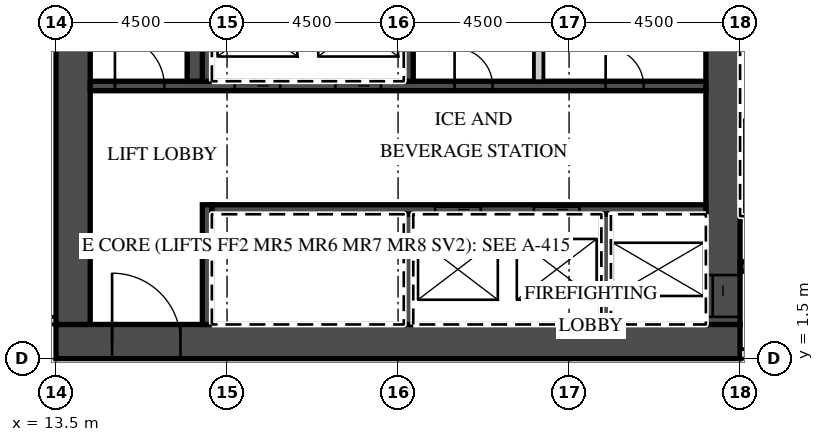
"""IFC4 building model, lengths in metres.
Left out: names, types, materials, properties, quantities, classifications, styles, units other than length and angle.
Written with IfcOpenShell. Run it as: python <this file> out.ifc"""

import sys

from ifc_helpers import new_model, si_unit, direction, frame, frame_2d, origin, place, context, subcontext, project, spatial, rectangle, extrude, element, fill, save


model = new_model("IFC4")
c1 = context("Model", 3, precision=1e-05, world=origin(), true_north=direction((0.0, 1.0)))
c2 = subcontext(c1, "Body", "Model", "MODEL_VIEW")
j1 = project(units=[si_unit("LENGTHUNIT", "METRE"), si_unit("PLANEANGLEUNIT", "RADIAN")], contexts=[c1])
p1 = place(None, origin())
s1 = spatial("IfcSite", under=j1, at=p1, CompositionType="ELEMENT")
p2 = place(p1, origin())
s2 = spatial("IfcBuilding", under=s1, at=p2, CompositionType="ELEMENT")
p3 = place(p2, frame((0.0, 0.0, 170.2)))
s3 = spatial("IfcBuildingStorey", under=s2, at=p3, CompositionType="ELEMENT", Elevation=170.2)
p4 = place(p3, frame((-13.5, 2.5, 0.0), z_axis=(0.0, 0.0, 1.0), x_axis=(1.0, 0.0, 0.0)))
e1 = element("IfcWall", 1, at=p4, inside=s3, PredefinedType="PARTITIONING", context=c2, shape_type="SweptSolid", body=[
    extrude(rectangle(XDim=27.0, YDim=0.2, at=frame_2d((13.5, 0.0))), origin(), (0.0, 0.0, 1.0), 3.02),
])
p5 = place(p4, frame((0.575, 0.0, 0.0)))
e2 = element("IfcOpeningElement", 2, at=p5, cuts=e1, PredefinedType="OPENING", context=c2, shape_type="SweptSolid", body=[
    extrude(rectangle(XDim=1.0, YDim=2.1, at=frame_2d((0.5, 1.05))), frame((0.0, 0.11, 0.0), z_axis=(0.0, -1.0, 0.0), x_axis=(1.0, 0.0, 0.0)), (0.0, 0.0, 1.0), 0.22),
])
p6 = place(p4, frame((7.45, 0.0, 0.0)))
e3 = element("IfcOpeningElement", 3, at=p6, cuts=e1, PredefinedType="OPENING", context=c2, shape_type="SweptSolid", body=[
    extrude(rectangle(XDim=1.0, YDim=2.1, at=frame_2d((0.5, 1.05))), frame((0.0, 0.11, 0.0), z_axis=(0.0, -1.0, 0.0), x_axis=(1.0, 0.0, 0.0)), (0.0, 0.0, 1.0), 0.22),
])
p7 = place(p4, frame((11.925, 0.0, 0.0)))
e4 = element("IfcOpeningElement", 4, at=p7, cuts=e1, PredefinedType="OPENING", context=c2, shape_type="SweptSolid", body=[
    extrude(rectangle(XDim=1.0, YDim=2.1, at=frame_2d((0.5, 1.05))), frame((0.0, 0.11, 0.0), z_axis=(0.0, -1.0, 0.0), x_axis=(1.0, 0.0, 0.0)), (0.0, 0.0, 1.0), 0.22),
])
p8 = place(p4, frame((15.938, 0.0, 0.0)))
e5 = element("IfcOpeningElement", 5, at=p8, cuts=e1, PredefinedType="OPENING", context=c2, shape_type="SweptSolid", body=[
    extrude(rectangle(XDim=1.2, YDim=2.1, at=frame_2d((0.6, 1.05))), frame((0.0, 0.11, 0.0), z_axis=(0.0, -1.0, 0.0), x_axis=(1.0, 0.0, 0.0)), (0.0, 0.0, 1.0), 0.22),
])
p9 = place(p4, frame((25.425, 0.0, 0.0)))
e6 = element("IfcOpeningElement", 6, at=p9, cuts=e1, PredefinedType="OPENING", context=c2, shape_type="SweptSolid", body=[
    extrude(rectangle(XDim=1.0, YDim=2.1, at=frame_2d((0.5, 1.05))), frame((0.0, 0.11, 0.0), z_axis=(0.0, -1.0, 0.0), x_axis=(1.0, 0.0, 0.0)), (0.0, 0.0, 1.0), 0.22),
])
p10 = place(p3, frame((13.5, 1.95, 0.0), z_axis=(0.0, 0.0, 1.0), x_axis=(1.0, 0.0, 0.0)))
e7 = element("IfcWall", 7, at=p10, inside=s3, PredefinedType="SHEAR", context=c2, shape_type="SweptSolid", body=[
    extrude(rectangle(XDim=18.0, YDim=0.9, at=frame_2d((9.0, 0.0))), origin(), (0.0, 0.0, 1.0), 3.02),
])
p11 = place(p10, frame((1.475, 0.0, 0.0)))
e8 = element("IfcOpeningElement", 8, at=p11, cuts=e7, PredefinedType="OPENING", context=c2, shape_type="SweptSolid", body=[
    extrude(rectangle(XDim=1.8, YDim=2.1, at=frame_2d((0.9, 1.05))), frame((0.0, 0.46, 0.0), z_axis=(0.0, -1.0, 0.0), x_axis=(1.0, 0.0, 0.0)), (0.0, 0.0, 1.0), 0.92),
])
p12 = place(p3, frame((31.05, 2.4, 0.0), z_axis=(0.0, 0.0, 1.0), x_axis=(0.0, 1.0, 0.0)))
e9 = element("IfcWall", 9, at=p12, inside=s3, PredefinedType="SHEAR", context=c2, shape_type="SweptSolid", body=[
    extrude(rectangle(XDim=12.8, YDim=0.9, at=frame_2d((6.4, 0.0))), origin(), (0.0, 0.0, 1.0), 3.02),
])
p13 = place(p12, frame((0.2, 0.0, 0.0)))
e10 = element("IfcOpeningElement", 10, at=p13, cuts=e9, PredefinedType="OPENING", context=c2, shape_type="SweptSolid", body=[
    extrude(rectangle(XDim=1.1, YDim=2.1, at=frame_2d((0.55, 1.05))), frame((0.0, 0.46, 0.0), z_axis=(0.0, -1.0, 0.0), x_axis=(1.0, 0.0, 0.0)), (0.0, 0.0, 1.0), 0.92),
])
p14 = place(p3, frame((13.95, 2.4, 0.0), z_axis=(0.0, 0.0, 1.0), x_axis=(0.0, 1.0, 0.0)))
e11 = element("IfcWall", 11, at=p14, inside=s3, PredefinedType="SHEAR", context=c2, shape_type="SweptSolid", body=[
    extrude(rectangle(XDim=12.2, YDim=0.9, at=frame_2d((6.1, 0.0))), origin(), (0.0, 0.0, 1.0), 3.02),
])
p15 = place(p3, frame((17.6, 5.425, 0.0), z_axis=(0.0, 0.0, 1.0), x_axis=(1.0, 0.0, 0.0)))
e12 = element("IfcWall", 12, at=p15, inside=s3, PredefinedType="SHEAR", context=c2, shape_type="SweptSolid", body=[
    extrude(rectangle(XDim=13.0, YDim=0.25, at=frame_2d((6.5, 0.0))), origin(), (0.0, 0.0, 1.0), 3.02),
])
p16 = place(p15, frame((8.475, 0.0, 0.0)))
e13 = element("IfcOpeningElement", 13, at=p16, cuts=e12, PredefinedType="OPENING", context=c2, shape_type="SweptSolid", body=[
    extrude(rectangle(XDim=1.2, YDim=2.1, at=frame_2d((0.6, 1.05))), frame((0.0, 0.135, 0.0), z_axis=(0.0, -1.0, 0.0), x_axis=(1.0, 0.0, 0.0)), (0.0, 0.0, 1.0), 0.27),
])
p17 = place(p15, frame((5.875, 0.0, 0.0)))
e14 = element("IfcOpeningElement", 14, at=p17, cuts=e12, PredefinedType="OPENING", context=c2, shape_type="SweptSolid", body=[
    extrude(rectangle(XDim=1.2, YDim=2.1, at=frame_2d((0.6, 1.05))), frame((0.0, 0.135, 0.0), z_axis=(0.0, -1.0, 0.0), x_axis=(1.0, 0.0, 0.0)), (0.0, 0.0, 1.0), 0.27),
])
p18 = place(p3, frame((17.475, 2.4, 0.0), z_axis=(0.0, 0.0, 1.0), x_axis=(0.0, 1.0, 0.0)))
e15 = element("IfcWall", 15, at=p18, inside=s3, PredefinedType="SHEAR", context=c2, shape_type="SweptSolid", body=[
    extrude(rectangle(XDim=3.15, YDim=0.25, at=frame_2d((1.575, 0.0))), origin(), (0.0, 0.0, 1.0), 3.02),
])
for number, where, z_axis, x_axis in (
    (16, (27.975, 2.4, 0.0), (0.0, 0.0, 1.0), (0.0, 1.0, 0.0)),
    (17, (22.775, 2.4, 0.0), (0.0, 0.0, 1.0), (0.0, 1.0, 0.0)),
):
    element("IfcWall", number, at=place(p3, frame(where, z_axis=z_axis, x_axis=x_axis)), inside=s3, PredefinedType="SHEAR", context=c2, shape_type="SweptSolid", body=[
        extrude(rectangle(XDim=2.9, YDim=0.25, at=frame_2d((1.45, 0.0))), origin(), (0.0, 0.0, 1.0), 3.02),
    ])
p19 = place(p3, frame((14.4, 8.675, 0.0), z_axis=(0.0, 0.0, 1.0), x_axis=(1.0, 0.0, 0.0)))
e18 = element("IfcWall", 18, at=p19, inside=s3, PredefinedType="SHEAR", context=c2, shape_type="SweptSolid", body=[
    extrude(rectangle(XDim=16.2, YDim=0.25, at=frame_2d((8.1, 0.0))), origin(), (0.0, 0.0, 1.0), 3.02),
])
p20 = place(p19, frame((6.45, 0.0, 0.0)))
e19 = element("IfcOpeningElement", 19, at=p20, cuts=e18, PredefinedType="OPENING", context=c2, shape_type="SweptSolid", body=[
    extrude(rectangle(XDim=1.2, YDim=2.1, at=frame_2d((0.6, 1.05))), frame((0.0, 0.135, 0.0), z_axis=(0.0, -1.0, 0.0), x_axis=(1.0, 0.0, 0.0)), (0.0, 0.0, 1.0), 0.27),
])
p21 = place(p19, frame((3.8, 0.0, 0.0)))
e20 = element("IfcOpeningElement", 20, at=p21, cuts=e18, PredefinedType="OPENING", context=c2, shape_type="SweptSolid", body=[
    extrude(rectangle(XDim=1.2, YDim=2.1, at=frame_2d((0.6, 1.05))), frame((0.0, 0.135, 0.0), z_axis=(0.0, -1.0, 0.0), x_axis=(1.0, 0.0, 0.0)), (0.0, 0.0, 1.0), 0.27),
])
p22 = place(p19, frame((0.65, 0.0, 0.0)))
e21 = element("IfcOpeningElement", 21, at=p22, cuts=e18, PredefinedType="OPENING", context=c2, shape_type="SweptSolid", body=[
    extrude(rectangle(XDim=1.3, YDim=2.1, at=frame_2d((0.65, 1.05))), frame((0.0, 0.135, 0.0), z_axis=(0.0, -1.0, 0.0), x_axis=(1.0, 0.0, 0.0)), (0.0, 0.0, 1.0), 0.27),
])
p23 = place(p19, frame((13.562, 0.0, 0.0)))
e22 = element("IfcOpeningElement", 22, at=p23, cuts=e18, PredefinedType="OPENING", context=c2, shape_type="SweptSolid", body=[
    extrude(rectangle(XDim=1.0, YDim=2.1, at=frame_2d((0.5, 1.05))), frame((0.0, 0.135, 0.0), z_axis=(0.0, -1.0, 0.0), x_axis=(1.0, 0.0, 0.0)), (0.0, 0.0, 1.0), 0.27),
])
p24 = place(p19, frame((9.587, 0.0, 0.0)))
e23 = element("IfcOpeningElement", 23, at=p24, cuts=e18, PredefinedType="OPENING", context=c2, shape_type="SweptSolid", body=[
    extrude(rectangle(XDim=1.0, YDim=2.1, at=frame_2d((0.5, 1.05))), frame((0.0, 0.135, 0.0), z_axis=(0.0, -1.0, 0.0), x_axis=(1.0, 0.0, 0.0)), (0.0, 0.0, 1.0), 0.27),
])
for number, where, z_axis, x_axis in (
    (24, (17.475, 8.8, 0.0), (0.0, 0.0, 1.0), (0.0, 1.0, 0.0)),
    (25, (22.775, 8.8, 0.0), (0.0, 0.0, 1.0), (0.0, 1.0, 0.0)),
):
    element("IfcWall", number, at=place(p3, frame(where, z_axis=z_axis, x_axis=x_axis)), inside=s3, PredefinedType="SHEAR", context=c2, shape_type="SweptSolid", body=[
        extrude(rectangle(XDim=2.9, YDim=0.25, at=frame_2d((1.45, 0.0))), origin(), (0.0, 0.0, 1.0), 3.02),
    ])
p25 = place(p3, frame((26.2, 8.8, 0.0), z_axis=(0.0, 0.0, 1.0), x_axis=(0.0, 1.0, 0.0)))
e26 = element("IfcWall", 26, at=p25, inside=s3, PredefinedType="PARTITIONING", context=c2, shape_type="SweptSolid", body=[
    extrude(rectangle(XDim=2.9, YDim=0.25, at=frame_2d((1.45, 0.0))), origin(), (0.0, 0.0, 1.0), 3.02),
])
p26 = place(p3, frame((17.15, 8.8, 0.0), z_axis=(0.0, 0.0, 1.0), x_axis=(0.0, 1.0, 0.0)))
e27 = element("IfcWall", 27, at=p26, inside=s3, PredefinedType="SHEAR", context=c2, shape_type="SweptSolid", body=[
    extrude(rectangle(XDim=5.8, YDim=0.4, at=frame_2d((2.9, 0.0))), origin(), (0.0, 0.0, 1.0), 3.02),
])
p27 = place(p3, frame((31.5, 1.625, 0.0), z_axis=(0.0, 0.0, 1.0), x_axis=(1.0, 0.0, 0.0)))
e28 = element("IfcWall", 28, at=p27, inside=s3, PredefinedType="PARTITIONING", context=c2, shape_type="SweptSolid", body=[
    extrude(rectangle(XDim=8.035, YDim=0.25, at=frame_2d((4.018, 0.0))), origin(), (0.0, 0.0, 1.0), 3.02),
])
p28 = place(p27, frame((0.625, 0.0, 0.0)))
e29 = element("IfcOpeningElement", 29, at=p28, cuts=e28, PredefinedType="OPENING", context=c2, shape_type="SweptSolid", body=[
    extrude(rectangle(XDim=1.3, YDim=2.1, at=frame_2d((0.65, 1.05))), frame((0.0, 0.135, 0.0), z_axis=(0.0, -1.0, 0.0), x_axis=(1.0, 0.0, 0.0)), (0.0, 0.0, 1.0), 0.27),
])
p29 = place(p27, frame((3.25, 0.0, 0.0)))
e30 = element("IfcOpeningElement", 30, at=p29, cuts=e28, PredefinedType="OPENING", context=c2, shape_type="SweptSolid", body=[
    extrude(rectangle(XDim=1.1, YDim=2.1, at=frame_2d((0.55, 1.05))), frame((0.0, 0.135, 0.0), z_axis=(0.0, -1.0, 0.0), x_axis=(1.0, 0.0, 0.0)), (0.0, 0.0, 1.0), 0.27),
])
p30 = place(p3, frame((31.5, 3.925, 0.0), z_axis=(0.0, 0.0, 1.0), x_axis=(1.0, 0.0, 0.0)))
e31 = element("IfcWall", 31, at=p30, inside=s3, PredefinedType="SHEAR", context=c2, shape_type="SweptSolid", body=[
    extrude(rectangle(XDim=2.55, YDim=0.25, at=frame_2d((1.275, 0.0))), origin(), (0.0, 0.0, 1.0), 3.02),
])
p31 = place(p30, frame((0.625, 0.0, 0.0)))
e32 = element("IfcOpeningElement", 32, at=p31, cuts=e31, PredefinedType="OPENING", context=c2, shape_type="SweptSolid", body=[
    extrude(rectangle(XDim=1.3, YDim=2.1, at=frame_2d((0.65, 1.05))), frame((0.0, 0.135, 0.0), z_axis=(0.0, -1.0, 0.0), x_axis=(1.0, 0.0, 0.0)), (0.0, 0.0, 1.0), 0.27),
])
p32 = place(p20, origin())
e33 = element("IfcDoor", 33, at=p32, inside=s3, OperationType="SLIDING_TO_LEFT", PredefinedType="DOOR", context=c2, shape_type="SweptSolid", body=[
    extrude(rectangle(XDim=1.2, YDim=2.1, at=frame_2d((0.6, 1.05))), frame((0.0, 0.025, 0.0), z_axis=(0.0, -1.0, 0.0), x_axis=(1.0, 0.0, 0.0)), (0.0, 0.0, 1.0), 0.05),
])
fill(e19, e33)
p33 = place(p21, origin())
e34 = element("IfcDoor", 34, at=p33, inside=s3, OperationType="SLIDING_TO_RIGHT", PredefinedType="DOOR", context=c2, shape_type="SweptSolid", body=[
    extrude(rectangle(XDim=1.2, YDim=2.1, at=frame_2d((0.6, 1.05))), frame((0.0, 0.025, 0.0), z_axis=(0.0, -1.0, 0.0), x_axis=(1.0, 0.0, 0.0)), (0.0, 0.0, 1.0), 0.05),
])
fill(e20, e34)
p34 = place(p16, origin())
e35 = element("IfcDoor", 35, at=p34, inside=s3, OperationType="SLIDING_TO_LEFT", PredefinedType="DOOR", context=c2, shape_type="SweptSolid", body=[
    extrude(rectangle(XDim=1.2, YDim=2.1, at=frame_2d((0.6, 1.05))), frame((0.0, 0.025, 0.0), z_axis=(0.0, -1.0, 0.0), x_axis=(1.0, 0.0, 0.0)), (0.0, 0.0, 1.0), 0.05),
])
fill(e13, e35)
p35 = place(p17, origin())
e36 = element("IfcDoor", 36, at=p35, inside=s3, OperationType="SLIDING_TO_RIGHT", PredefinedType="DOOR", context=c2, shape_type="SweptSolid", body=[
    extrude(rectangle(XDim=1.2, YDim=2.1, at=frame_2d((0.6, 1.05))), frame((0.0, 0.025, 0.0), z_axis=(0.0, -1.0, 0.0), x_axis=(1.0, 0.0, 0.0)), (0.0, 0.0, 1.0), 0.05),
])
fill(e14, e36)
p36 = place(p13, origin())
e37 = element("IfcDoor", 37, at=p36, inside=s3, OperationType="SLIDING_TO_LEFT", PredefinedType="DOOR", context=c2, shape_type="SweptSolid", body=[
    extrude(rectangle(XDim=1.1, YDim=2.1, at=frame_2d((0.55, 1.05))), frame((0.0, 0.025, 0.0), z_axis=(0.0, -1.0, 0.0), x_axis=(1.0, 0.0, 0.0)), (0.0, 0.0, 1.0), 0.05),
])
fill(e10, e37)
p37 = place(p11, origin())
e38 = element("IfcDoor", 38, at=p37, inside=s3, OperationType="DOUBLE_DOOR_DOUBLE_SWING", PredefinedType="DOOR", context=c2, shape_type="SweptSolid", body=[
    extrude(rectangle(XDim=1.8, YDim=2.1, at=frame_2d((0.9, 1.05))), frame((0.0, 0.025, 0.0), z_axis=(0.0, -1.0, 0.0), x_axis=(1.0, 0.0, 0.0)), (0.0, 0.0, 1.0), 0.05),
])
fill(e8, e38)
p38 = place(p22, origin())
e39 = element("IfcDoor", 39, at=p38, inside=s3, OperationType="SINGLE_SWING_LEFT", PredefinedType="DOOR", context=c2, shape_type="SweptSolid", body=[
    extrude(rectangle(XDim=1.3, YDim=2.1, at=frame_2d((0.65, 1.05))), frame((0.0, 0.025, 0.0), z_axis=(0.0, -1.0, 0.0), x_axis=(1.0, 0.0, 0.0)), (0.0, 0.0, 1.0), 0.05),
])
fill(e21, e39)
p39 = place(p23, origin())
e40 = element("IfcDoor", 40, at=p39, inside=s3, OperationType="SINGLE_SWING_LEFT", PredefinedType="DOOR", context=c2, shape_type="SweptSolid", body=[
    extrude(rectangle(XDim=1.0, YDim=2.1, at=frame_2d((0.5, 1.05))), frame((0.0, 0.025, 0.0), z_axis=(0.0, -1.0, 0.0), x_axis=(1.0, 0.0, 0.0)), (0.0, 0.0, 1.0), 0.05),
])
fill(e22, e40)
p40 = place(p24, origin())
e41 = element("IfcDoor", 41, at=p40, inside=s3, OperationType="SINGLE_SWING_LEFT", PredefinedType="DOOR", context=c2, shape_type="SweptSolid", body=[
    extrude(rectangle(XDim=1.0, YDim=2.1, at=frame_2d((0.5, 1.05))), frame((0.0, 0.025, 0.0), z_axis=(0.0, -1.0, 0.0), x_axis=(1.0, 0.0, 0.0)), (0.0, 0.0, 1.0), 0.05),
])
fill(e23, e41)
save(model, sys.argv[1])
